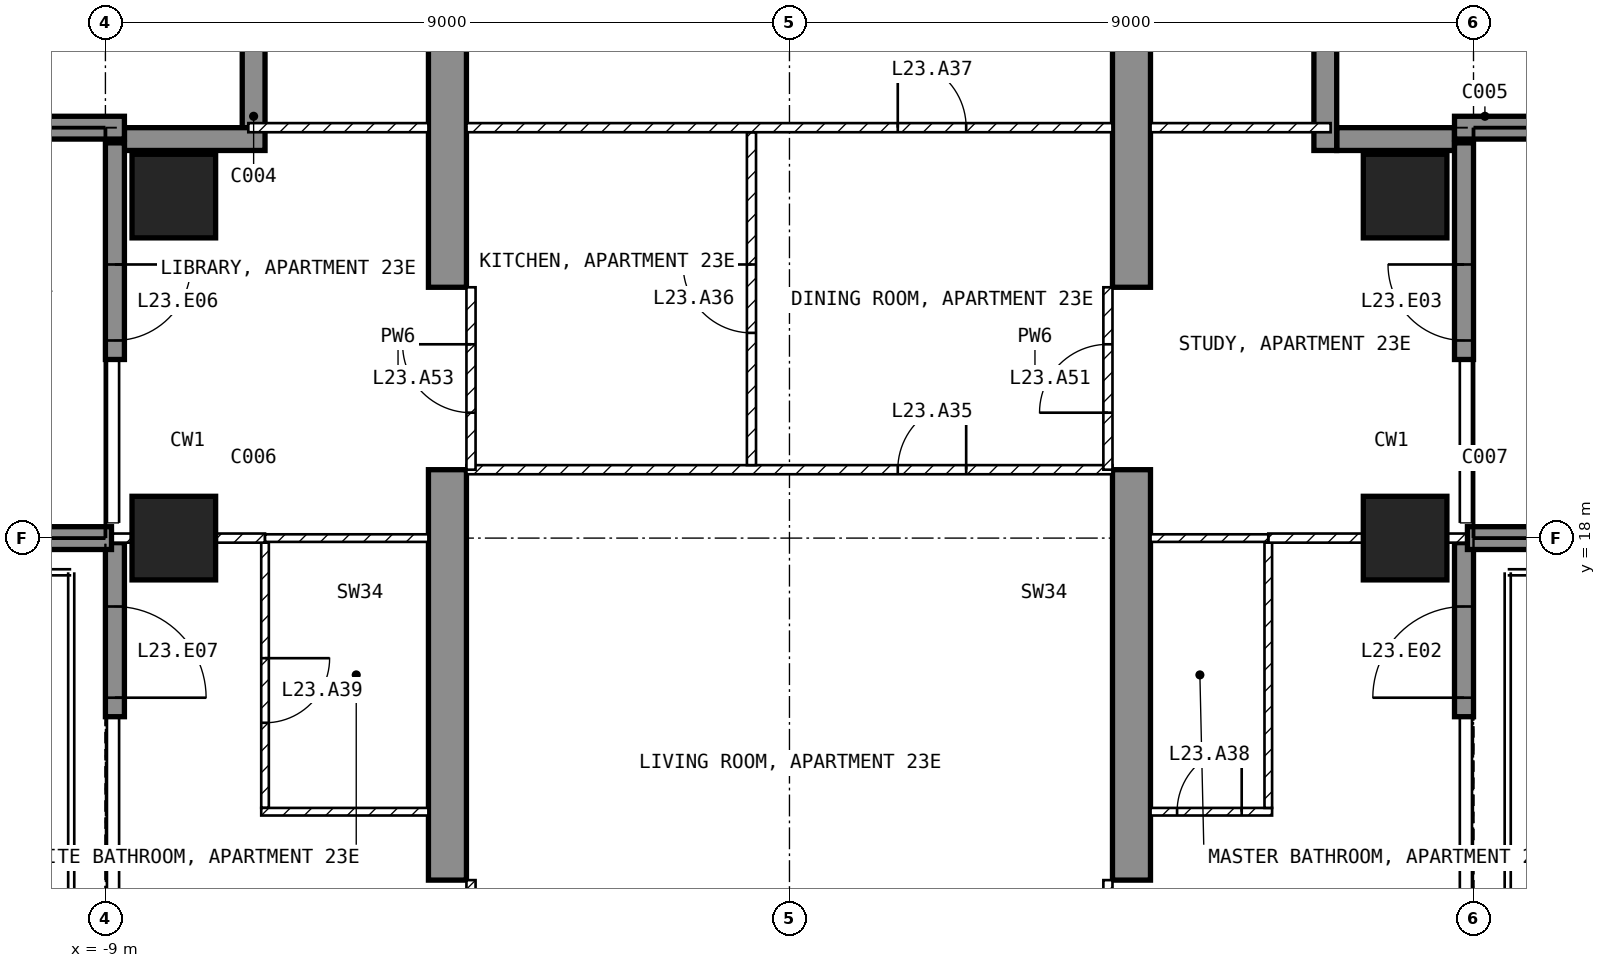
"""IFC4 building model, lengths in metres.
Left out: names, types, materials, properties, quantities, classifications, styles, units other than length and angle.
Written with IfcOpenShell. Run it as: python <this file> out.ifc"""

import sys

from ifc_helpers import new_model, si_unit, direction, frame, frame_2d, origin, origin_2d, place, context, subcontext, project, spatial, polyline, rectangle, outline, extrude, element, fill, save


model = new_model("IFC4")
c1 = context("Model", 3, precision=1e-05, world=origin(), true_north=direction((0.0, 1.0)))
c2 = subcontext(c1, "Body", "Model", "MODEL_VIEW")
j1 = project(units=[si_unit("LENGTHUNIT", "METRE"), si_unit("PLANEANGLEUNIT", "RADIAN")], contexts=[c1])
p1 = place(None, origin())
s1 = spatial("IfcSite", under=j1, at=p1, CompositionType="ELEMENT")
p2 = place(p1, origin())
s2 = spatial("IfcBuilding", under=s1, at=p2, CompositionType="ELEMENT")
p3 = place(p2, frame((0.0, 0.0, 102.4)))
s3 = spatial("IfcBuildingStorey", under=s2, at=p3, CompositionType="ELEMENT", Elevation=102.4)
for number, where, z_axis, x_axis in (
    (1, (-8.1, 18.0, -0.25), (0.0, 0.0, 1.0), (1.0, 0.0, 0.0)),
    (2, (-8.1, 22.5, -0.25), (0.0, 0.0, 1.0), (1.0, 0.0, 0.0)),
    (3, (8.1, 18.0, -0.25), (0.0, 0.0, 1.0), (1.0, 0.0, 0.0)),
    (4, (8.1, 22.5, -0.25), (0.0, 0.0, 1.0), (1.0, 0.0, 0.0)),
):
    element("IfcColumn", number, at=place(p3, frame(where, z_axis=z_axis, x_axis=x_axis)), inside=s3, PredefinedType="COLUMN", context=c2, shape_type="SweptSolid", body=[
        extrude(rectangle(XDim=1.1, YDim=1.1, at=origin_2d()), origin(), (0.0, 0.0, 1.0), 3.5),
    ])
for number, where, z_axis, x_axis in (
    (5, (-4.75, 9.0, -0.25), (1.0, 0.0, 0.0), (0.0, 1.0, 0.0)),
    (6, (4.25, 9.0, -0.25), (1.0, 0.0, 0.0), (0.0, 1.0, 0.0)),
):
    element("IfcWall", number, at=place(p3, frame(where, z_axis=z_axis, x_axis=x_axis)), inside=s3, PredefinedType="SHEAR", context=c2, shape_type="SweptSolid", body=[
        extrude(outline(polyline([(0.0, 0.0), (2.1, 0.0), (2.1, 2.65), (4.5, 2.65), (4.5, 0.0), (9.9, 0.0), (9.9, 2.65), (12.3, 2.65), (12.3, 0.0), (16.55, 0.0), (16.55, 3.5), (0.0, 3.5), (0.0, 0.0)])), origin(), (0.0, 0.0, 1.0), 0.5),
    ])
p4 = place(p3, frame((8.875, 15.65, 0.0), z_axis=(0.0, 0.0, 1.0), x_axis=(0.0, 1.0, 0.0)))
e7 = element("IfcWall", 7, at=p4, inside=s3, PredefinedType="SOLIDWALL", context=c2, shape_type="SweptSolid", body=[
    extrude(rectangle(XDim=2.29, YDim=0.25, at=frame_2d((1.145, 0.0))), origin(), (0.0, 0.0, 1.0), 3.25),
])
p5 = place(p4, frame((0.25, 0.0, 0.0)))
e8 = element("IfcOpeningElement", 8, at=p5, cuts=e7, PredefinedType="OPENING", context=c2, shape_type="SweptSolid", body=[
    extrude(rectangle(XDim=1.2, YDim=2.4, at=frame_2d((0.6, 1.2))), frame((0.0, 0.135, 0.0), z_axis=(0.0, -1.0, 0.0), x_axis=(1.0, 0.0, 0.0)), (0.0, 0.0, 1.0), 0.27),
])
p6 = place(p3, frame((8.875, 20.35, 0.0), z_axis=(0.0, 0.0, 1.0), x_axis=(0.0, 1.0, 0.0)))
e9 = element("IfcWall", 9, at=p6, inside=s3, PredefinedType="SOLIDWALL", context=c2, shape_type="SweptSolid", body=[
    extrude(rectangle(XDim=2.85, YDim=0.25, at=frame_2d((1.425, 0.0))), origin(), (0.0, 0.0, 1.0), 3.25),
])
p7 = place(p6, frame((0.25, 0.0, 0.0)))
e10 = element("IfcOpeningElement", 10, at=p7, cuts=e9, PredefinedType="OPENING", context=c2, shape_type="SweptSolid", body=[
    extrude(rectangle(XDim=1.0, YDim=2.4, at=frame_2d((0.5, 1.2))), frame((0.0, 0.135, 0.0), z_axis=(0.0, -1.0, 0.0), x_axis=(1.0, 0.0, 0.0)), (0.0, 0.0, 1.0), 0.27),
])
p8 = place(p3, frame((-8.875, 23.2, 0.0), z_axis=(0.0, 0.0, 1.0), x_axis=(0.0, -1.0, 0.0)))
e11 = element("IfcWall", 11, at=p8, inside=s3, PredefinedType="SOLIDWALL", context=c2, shape_type="SweptSolid", body=[
    extrude(rectangle(XDim=2.85, YDim=0.25, at=frame_2d((1.425, 0.0))), origin(), (0.0, 0.0, 1.0), 3.25),
])
p9 = place(p8, frame((1.6, 0.0, 0.0)))
e12 = element("IfcOpeningElement", 12, at=p9, cuts=e11, PredefinedType="OPENING", context=c2, shape_type="SweptSolid", body=[
    extrude(rectangle(XDim=1.0, YDim=2.4, at=frame_2d((0.5, 1.2))), frame((0.0, 0.135, 0.0), z_axis=(0.0, -1.0, 0.0), x_axis=(1.0, 0.0, 0.0)), (0.0, 0.0, 1.0), 0.27),
])
p10 = place(p3, frame((-8.875, 17.94, 0.0), z_axis=(0.0, 0.0, 1.0), x_axis=(0.0, -1.0, 0.0)))
e13 = element("IfcWall", 13, at=p10, inside=s3, PredefinedType="SOLIDWALL", context=c2, shape_type="SweptSolid", body=[
    extrude(rectangle(XDim=2.29, YDim=0.25, at=frame_2d((1.145, 0.0))), origin(), (0.0, 0.0, 1.0), 3.25),
])
p11 = place(p10, frame((0.84, 0.0, 0.0)))
e14 = element("IfcOpeningElement", 14, at=p11, cuts=e13, PredefinedType="OPENING", context=c2, shape_type="SweptSolid", body=[
    extrude(rectangle(XDim=1.2, YDim=2.4, at=frame_2d((0.6, 1.2))), frame((0.0, 0.135, 0.0), z_axis=(0.0, -1.0, 0.0), x_axis=(1.0, 0.0, 0.0)), (0.0, 0.0, 1.0), 0.27),
])
p12 = place(p3, frame((8.75, 23.25, 0.0), z_axis=(0.0, 0.0, 1.0), x_axis=(-1.0, 0.0, 0.0)))
e15 = element("IfcWall", 15, at=p12, inside=s3, PredefinedType="SOLIDWALL", context=c2, shape_type="SweptSolid", body=[
    extrude(rectangle(XDim=1.55, YDim=0.3, at=frame_2d((0.775, 0.0))), origin(), (0.0, 0.0, 1.0), 3.25),
])
p13 = place(p3, frame((7.05, 23.1, 0.0), z_axis=(0.0, 0.0, 1.0), x_axis=(0.0, 1.0, 0.0)))
e16 = element("IfcWall", 16, at=p13, inside=s3, PredefinedType="SOLIDWALL", context=c2, shape_type="SweptSolid", body=[
    extrude(rectangle(XDim=1.8, YDim=0.3, at=frame_2d((0.9, 0.0))), origin(), (0.0, 0.0, 1.0), 3.25),
])
p14 = place(p3, frame((-7.05, 25.2, 0.0), z_axis=(0.0, 0.0, 1.0), x_axis=(0.0, -1.0, 0.0)))
e17 = element("IfcWall", 17, at=p14, inside=s3, PredefinedType="SOLIDWALL", context=c2, shape_type="SweptSolid", body=[
    extrude(rectangle(XDim=1.8, YDim=0.3, at=frame_2d((0.9, 0.0))), origin(), (0.0, 0.0, 1.0), 3.25),
])
p15 = place(p3, frame((-6.9, 23.25, 0.0), z_axis=(0.0, 0.0, 1.0), x_axis=(-1.0, 0.0, 0.0)))
e18 = element("IfcWall", 18, at=p15, inside=s3, PredefinedType="SOLIDWALL", context=c2, shape_type="SweptSolid", body=[
    extrude(rectangle(XDim=1.85, YDim=0.3, at=frame_2d((0.925, 0.0))), origin(), (0.0, 0.0, 1.0), 3.25),
])
p16 = place(p3, frame((-8.92, 18.0, 0.0), z_axis=(0.0, 0.0, 1.0), x_axis=(-1.0, 0.0, 0.0)))
e19 = element("IfcWall", 19, at=p16, inside=s3, PredefinedType="SOLIDWALL", context=c2, shape_type="SweptSolid", body=[
    extrude(rectangle(XDim=2.82, YDim=0.3, at=frame_2d((1.41, 0.0))), origin(), (0.0, 0.0, 1.0), 3.25),
])
p17 = place(p3, frame((-8.75, 23.4, 0.0), z_axis=(0.0, 0.0, 1.0), x_axis=(-1.0, 0.0, 0.0)))
e20 = element("IfcWall", 20, at=p17, inside=s3, PredefinedType="SOLIDWALL", context=c2, shape_type="SweptSolid", body=[
    extrude(rectangle(XDim=2.95, YDim=0.3, at=frame_2d((1.475, 0.0))), origin(), (0.0, 0.0, 1.0), 3.25),
])
p18 = place(p3, frame((8.92, 18.0, 0.0), z_axis=(0.0, 0.0, 1.0), x_axis=(1.0, 0.0, 0.0)))
e21 = element("IfcWall", 21, at=p18, inside=s3, PredefinedType="SOLIDWALL", context=c2, shape_type="SweptSolid", body=[
    extrude(rectangle(XDim=2.82, YDim=0.3, at=frame_2d((1.41, 0.0))), origin(), (0.0, 0.0, 1.0), 3.25),
])
p19 = place(p3, frame((8.75, 23.4, 0.0), z_axis=(0.0, 0.0, 1.0), x_axis=(1.0, 0.0, 0.0)))
e22 = element("IfcWall", 22, at=p19, inside=s3, PredefinedType="SOLIDWALL", context=c2, shape_type="SweptSolid", body=[
    extrude(rectangle(XDim=2.95, YDim=0.3, at=frame_2d((1.475, 0.0))), origin(), (0.0, 0.0, 1.0), 3.25),
])
p20 = place(p3, frame((-4.25, 18.9, 0.0), z_axis=(0.0, 0.0, 1.0), x_axis=(1.0, 0.0, 0.0)))
e23 = element("IfcWall", 23, at=p20, inside=s3, PredefinedType="PARTITIONING", context=c2, shape_type="SweptSolid", body=[
    extrude(rectangle(XDim=8.5, YDim=0.12, at=frame_2d((4.25, 0.0))), origin(), (0.0, 0.0, 1.0), 3.25),
])
p21 = place(p20, frame((5.675, 0.0, 0.0)))
e24 = element("IfcOpeningElement", 24, at=p21, cuts=e23, PredefinedType="OPENING", context=c2, shape_type="SweptSolid", body=[
    extrude(rectangle(XDim=0.9, YDim=2.1, at=frame_2d((0.45, 1.05))), frame((0.0, 0.07, 0.0), z_axis=(0.0, -1.0, 0.0), x_axis=(1.0, 0.0, 0.0)), (0.0, 0.0, 1.0), 0.14),
])
p22 = place(p3, frame((-0.5, 18.96, 0.0), z_axis=(0.0, 0.0, 1.0), x_axis=(0.0, 1.0, 0.0)))
e25 = element("IfcWall", 25, at=p22, inside=s3, PredefinedType="PARTITIONING", context=c2, shape_type="SweptSolid", body=[
    extrude(rectangle(XDim=4.38, YDim=0.12, at=frame_2d((2.19, 0.0))), origin(), (0.0, 0.0, 1.0), 3.25),
])
p23 = place(p22, frame((1.74, 0.0, 0.0)))
e26 = element("IfcOpeningElement", 26, at=p23, cuts=e25, PredefinedType="OPENING", context=c2, shape_type="SweptSolid", body=[
    extrude(rectangle(XDim=0.9, YDim=2.1, at=frame_2d((0.45, 1.05))), frame((0.0, 0.07, 0.0), z_axis=(0.0, -1.0, 0.0), x_axis=(1.0, 0.0, 0.0)), (0.0, 0.0, 1.0), 0.14),
])
p24 = place(p3, frame((-4.25, 23.4, 0.0), z_axis=(0.0, 0.0, 1.0), x_axis=(1.0, 0.0, 0.0)))
e27 = element("IfcWall", 27, at=p24, inside=s3, PredefinedType="PARTITIONING", context=c2, shape_type="SweptSolid", body=[
    extrude(rectangle(XDim=8.5, YDim=0.12, at=frame_2d((4.25, 0.0))), origin(), (0.0, 0.0, 1.0), 3.25),
])
p25 = place(p24, frame((5.675, 0.0, 0.0)))
e28 = element("IfcOpeningElement", 28, at=p25, cuts=e27, PredefinedType="OPENING", context=c2, shape_type="SweptSolid", body=[
    extrude(rectangle(XDim=0.9, YDim=2.1, at=frame_2d((0.45, 1.05))), frame((0.0, 0.07, 0.0), z_axis=(0.0, -1.0, 0.0), x_axis=(1.0, 0.0, 0.0)), (0.0, 0.0, 1.0), 0.14),
])
p26 = place(p3, frame((4.75, 14.4, 0.0), z_axis=(0.0, 0.0, 1.0), x_axis=(1.0, 0.0, 0.0)))
e29 = element("IfcWall", 29, at=p26, inside=s3, PredefinedType="PARTITIONING", context=c2, shape_type="SweptSolid", body=[
    extrude(rectangle(XDim=1.6, YDim=0.1, at=frame_2d((0.8, 0.0))), origin(), (0.0, 0.0, 1.0), 3.25),
])
p27 = place(p26, frame((0.35, 0.0, 0.0)))
e30 = element("IfcOpeningElement", 30, at=p27, cuts=e29, PredefinedType="OPENING", context=c2, shape_type="SweptSolid", body=[
    extrude(rectangle(XDim=0.85, YDim=2.1, at=frame_2d((0.425, 1.05))), frame((0.0, 0.06, 0.0), z_axis=(0.0, -1.0, 0.0), x_axis=(1.0, 0.0, 0.0)), (0.0, 0.0, 1.0), 0.12),
])
p28 = place(p3, frame((6.3, 14.45, 0.0), z_axis=(0.0, 0.0, 1.0), x_axis=(0.0, 1.0, 0.0)))
e31 = element("IfcWall", 31, at=p28, inside=s3, PredefinedType="PARTITIONING", context=c2, shape_type="SweptSolid", body=[
    extrude(rectangle(XDim=3.49, YDim=0.1, at=frame_2d((1.745, 0.0))), origin(), (0.0, 0.0, 1.0), 3.25),
])
p29 = place(p3, frame((6.3, 18.0, 0.0), z_axis=(0.0, 0.0, 1.0), x_axis=(1.0, 0.0, 0.0)))
e32 = element("IfcWall", 32, at=p29, inside=s3, PredefinedType="PARTITIONING", context=c2, shape_type="SweptSolid", body=[
    extrude(rectangle(XDim=2.62, YDim=0.12, at=frame_2d((1.31, 0.0))), origin(), (0.0, 0.0, 1.0), 2.414),
])
p30 = place(p3, frame((4.75, 18.0, 0.0), z_axis=(0.0, 0.0, 1.0), x_axis=(1.0, 0.0, 0.0)))
e33 = element("IfcWall", 33, at=p30, inside=s3, PredefinedType="PARTITIONING", context=c2, shape_type="SweptSolid", body=[
    extrude(rectangle(XDim=1.55, YDim=0.1, at=frame_2d((0.775, 0.0))), origin(), (0.0, 0.0, 1.0), 2.414),
])
p31 = place(p3, frame((4.75, 23.4, 0.0), z_axis=(0.0, 0.0, 1.0), x_axis=(1.0, 0.0, 0.0)))
e34 = element("IfcWall", 34, at=p31, inside=s3, PredefinedType="PARTITIONING", context=c2, shape_type="SweptSolid", body=[
    extrude(rectangle(XDim=2.37, YDim=0.12, at=frame_2d((1.185, 0.0))), origin(), (0.0, 0.0, 1.0), 3.25),
])
p32 = place(p3, frame((-6.9, 17.94, 0.0), z_axis=(0.0, 0.0, 1.0), x_axis=(0.0, -1.0, 0.0)))
e35 = element("IfcWall", 35, at=p32, inside=s3, PredefinedType="PARTITIONING", context=c2, shape_type="SweptSolid", body=[
    extrude(rectangle(XDim=3.49, YDim=0.1, at=frame_2d((1.745, 0.0))), origin(), (0.0, 0.0, 1.0), 3.25),
])
p33 = place(p32, frame((1.52, 0.0, 0.0)))
e36 = element("IfcOpeningElement", 36, at=p33, cuts=e35, PredefinedType="OPENING", context=c2, shape_type="SweptSolid", body=[
    extrude(rectangle(XDim=0.85, YDim=2.1, at=frame_2d((0.425, 1.05))), frame((0.0, 0.06, 0.0), z_axis=(0.0, -1.0, 0.0), x_axis=(1.0, 0.0, 0.0)), (0.0, 0.0, 1.0), 0.12),
])
p34 = place(p3, frame((-6.95, 14.4, 0.0), z_axis=(0.0, 0.0, 1.0), x_axis=(1.0, 0.0, 0.0)))
e37 = element("IfcWall", 37, at=p34, inside=s3, PredefinedType="PARTITIONING", context=c2, shape_type="SweptSolid", body=[
    extrude(rectangle(XDim=2.2, YDim=0.1, at=frame_2d((1.1, 0.0))), origin(), (0.0, 0.0, 1.0), 3.25),
])
p35 = place(p3, frame((-8.92, 18.0, 0.0), z_axis=(0.0, 0.0, 1.0), x_axis=(1.0, 0.0, 0.0)))
e38 = element("IfcWall", 38, at=p35, inside=s3, PredefinedType="PARTITIONING", context=c2, shape_type="SweptSolid", body=[
    extrude(rectangle(XDim=2.02, YDim=0.12, at=frame_2d((1.01, 0.0))), origin(), (0.0, 0.0, 1.0), 2.414),
])
p36 = place(p3, frame((-6.9, 18.0, 0.0), z_axis=(0.0, 0.0, 1.0), x_axis=(1.0, 0.0, 0.0)))
e39 = element("IfcWall", 39, at=p36, inside=s3, PredefinedType="PARTITIONING", context=c2, shape_type="SweptSolid", body=[
    extrude(rectangle(XDim=2.15, YDim=0.1, at=frame_2d((1.075, 0.0))), origin(), (0.0, 0.0, 1.0), 2.414),
])
p37 = place(p3, frame((-7.12, 23.4, 0.0), z_axis=(0.0, 0.0, 1.0), x_axis=(1.0, 0.0, 0.0)))
e40 = element("IfcWall", 40, at=p37, inside=s3, PredefinedType="PARTITIONING", context=c2, shape_type="SweptSolid", body=[
    extrude(rectangle(XDim=2.37, YDim=0.12, at=frame_2d((1.185, 0.0))), origin(), (0.0, 0.0, 1.0), 3.25),
])
p38 = place(p3, frame((4.19, 11.1, 0.0), z_axis=(0.0, 0.0, 1.0), x_axis=(0.0, 1.0, 0.0)))
e41 = element("IfcWall", 41, at=p38, inside=s3, PredefinedType="PARTITIONING", context=c2, shape_type="SweptSolid", body=[
    extrude(rectangle(XDim=2.4, YDim=0.12, at=frame_2d((1.2, 0.0))), origin(), (0.0, 0.0, 1.0), 2.4),
])
p39 = place(p38, frame((0.75, 0.0, 0.0)))
e42 = element("IfcOpeningElement", 42, at=p39, cuts=e41, PredefinedType="OPENING", context=c2, shape_type="SweptSolid", body=[
    extrude(rectangle(XDim=0.9, YDim=2.1, at=frame_2d((0.45, 1.05))), frame((0.0, 0.07, 0.0), z_axis=(0.0, -1.0, 0.0), x_axis=(1.0, 0.0, 0.0)), (0.0, 0.0, 1.0), 0.14),
])
p40 = place(p3, frame((4.19, 18.9, 0.0), z_axis=(0.0, 0.0, 1.0), x_axis=(0.0, 1.0, 0.0)))
e43 = element("IfcWall", 43, at=p40, inside=s3, PredefinedType="PARTITIONING", context=c2, shape_type="SweptSolid", body=[
    extrude(rectangle(XDim=2.4, YDim=0.12, at=frame_2d((1.2, 0.0))), origin(), (0.0, 0.0, 1.0), 2.4),
])
p41 = place(p40, frame((0.75, 0.0, 0.0)))
e44 = element("IfcOpeningElement", 44, at=p41, cuts=e43, PredefinedType="OPENING", context=c2, shape_type="SweptSolid", body=[
    extrude(rectangle(XDim=0.9, YDim=2.1, at=frame_2d((0.45, 1.05))), frame((0.0, 0.07, 0.0), z_axis=(0.0, -1.0, 0.0), x_axis=(1.0, 0.0, 0.0)), (0.0, 0.0, 1.0), 0.14),
])
p42 = place(p3, frame((-4.19, 11.1, 0.0), z_axis=(0.0, 0.0, 1.0), x_axis=(0.0, 1.0, 0.0)))
e45 = element("IfcWall", 45, at=p42, inside=s3, PredefinedType="PARTITIONING", context=c2, shape_type="SweptSolid", body=[
    extrude(rectangle(XDim=2.4, YDim=0.12, at=frame_2d((1.2, 0.0))), origin(), (0.0, 0.0, 1.0), 2.4),
])
p43 = place(p42, frame((0.75, 0.0, 0.0)))
e46 = element("IfcOpeningElement", 46, at=p43, cuts=e45, PredefinedType="OPENING", context=c2, shape_type="SweptSolid", body=[
    extrude(rectangle(XDim=0.9, YDim=2.1, at=frame_2d((0.45, 1.05))), frame((0.0, 0.07, 0.0), z_axis=(0.0, -1.0, 0.0), x_axis=(1.0, 0.0, 0.0)), (0.0, 0.0, 1.0), 0.14),
])
p44 = place(p3, frame((-4.19, 18.9, 0.0), z_axis=(0.0, 0.0, 1.0), x_axis=(0.0, 1.0, 0.0)))
e47 = element("IfcWall", 47, at=p44, inside=s3, PredefinedType="PARTITIONING", context=c2, shape_type="SweptSolid", body=[
    extrude(rectangle(XDim=2.4, YDim=0.12, at=frame_2d((1.2, 0.0))), origin(), (0.0, 0.0, 1.0), 2.4),
])
p45 = place(p44, frame((0.75, 0.0, 0.0)))
e48 = element("IfcOpeningElement", 48, at=p45, cuts=e47, PredefinedType="OPENING", context=c2, shape_type="SweptSolid", body=[
    extrude(rectangle(XDim=0.9, YDim=2.1, at=frame_2d((0.45, 1.05))), frame((0.0, 0.07, 0.0), z_axis=(0.0, -1.0, 0.0), x_axis=(1.0, 0.0, 0.0)), (0.0, 0.0, 1.0), 0.14),
])
p46 = place(p5, origin())
e49 = element("IfcDoor", 49, at=p46, inside=s3, OperationType="SINGLE_SWING_LEFT", PredefinedType="DOOR", context=c2, shape_type="SweptSolid", body=[
    extrude(rectangle(XDim=1.2, YDim=2.4, at=frame_2d((0.6, 1.2))), frame((0.0, 0.025, 0.0), z_axis=(0.0, -1.0, 0.0), x_axis=(1.0, 0.0, 0.0)), (0.0, 0.0, 1.0), 0.05),
])
fill(e8, e49)
p47 = place(p7, origin())
e50 = element("IfcDoor", 50, at=p47, inside=s3, OperationType="SINGLE_SWING_RIGHT", PredefinedType="DOOR", context=c2, shape_type="SweptSolid", body=[
    extrude(rectangle(XDim=1.0, YDim=2.4, at=frame_2d((0.5, 1.2))), frame((0.0, 0.025, 0.0), z_axis=(0.0, -1.0, 0.0), x_axis=(1.0, 0.0, 0.0)), (0.0, 0.0, 1.0), 0.05),
])
fill(e10, e50)
p48 = place(p9, origin())
e51 = element("IfcDoor", 51, at=p48, inside=s3, OperationType="SINGLE_SWING_LEFT", PredefinedType="DOOR", context=c2, shape_type="SweptSolid", body=[
    extrude(rectangle(XDim=1.0, YDim=2.4, at=frame_2d((0.5, 1.2))), frame((0.0, 0.025, 0.0), z_axis=(0.0, -1.0, 0.0), x_axis=(1.0, 0.0, 0.0)), (0.0, 0.0, 1.0), 0.05),
])
fill(e12, e51)
p49 = place(p11, origin())
e52 = element("IfcDoor", 52, at=p49, inside=s3, OperationType="SINGLE_SWING_RIGHT", PredefinedType="DOOR", context=c2, shape_type="SweptSolid", body=[
    extrude(rectangle(XDim=1.2, YDim=2.4, at=frame_2d((0.6, 1.2))), frame((0.0, 0.025, 0.0), z_axis=(0.0, -1.0, 0.0), x_axis=(1.0, 0.0, 0.0)), (0.0, 0.0, 1.0), 0.05),
])
fill(e14, e52)
p50 = place(p21, origin())
e53 = element("IfcDoor", 53, at=p50, inside=s3, OperationType="SINGLE_SWING_RIGHT", PredefinedType="DOOR", context=c2, shape_type="SweptSolid", body=[
    extrude(rectangle(XDim=0.9, YDim=2.1, at=frame_2d((0.45, 1.05))), frame((0.0, 0.025, 0.0), z_axis=(0.0, -1.0, 0.0), x_axis=(1.0, 0.0, 0.0)), (0.0, 0.0, 1.0), 0.05),
])
fill(e24, e53)
p51 = place(p23, origin())
e54 = element("IfcDoor", 54, at=p51, inside=s3, OperationType="SINGLE_SWING_RIGHT", PredefinedType="DOOR", context=c2, shape_type="SweptSolid", body=[
    extrude(rectangle(XDim=0.9, YDim=2.1, at=frame_2d((0.45, 1.05))), frame((0.0, 0.025, 0.0), z_axis=(0.0, -1.0, 0.0), x_axis=(1.0, 0.0, 0.0)), (0.0, 0.0, 1.0), 0.05),
])
fill(e26, e54)
p52 = place(p25, origin())
e55 = element("IfcDoor", 55, at=p52, inside=s3, OperationType="SINGLE_SWING_LEFT", PredefinedType="DOOR", context=c2, shape_type="SweptSolid", body=[
    extrude(rectangle(XDim=0.9, YDim=2.1, at=frame_2d((0.45, 1.05))), frame((0.0, 0.025, 0.0), z_axis=(0.0, -1.0, 0.0), x_axis=(1.0, 0.0, 0.0)), (0.0, 0.0, 1.0), 0.05),
])
fill(e28, e55)
p53 = place(p27, origin())
e56 = element("IfcDoor", 56, at=p53, inside=s3, OperationType="SINGLE_SWING_RIGHT", PredefinedType="DOOR", context=c2, shape_type="SweptSolid", body=[
    extrude(rectangle(XDim=0.85, YDim=2.1, at=frame_2d((0.425, 1.05))), frame((0.0, 0.025, 0.0), z_axis=(0.0, -1.0, 0.0), x_axis=(1.0, 0.0, 0.0)), (0.0, 0.0, 1.0), 0.05),
])
fill(e30, e56)
p54 = place(p33, origin())
e57 = element("IfcDoor", 57, at=p54, inside=s3, OperationType="SINGLE_SWING_LEFT", PredefinedType="DOOR", context=c2, shape_type="SweptSolid", body=[
    extrude(rectangle(XDim=0.85, YDim=2.1, at=frame_2d((0.425, 1.05))), frame((0.0, 0.025, 0.0), z_axis=(0.0, -1.0, 0.0), x_axis=(1.0, 0.0, 0.0)), (0.0, 0.0, 1.0), 0.05),
])
fill(e36, e57)
p55 = place(p41, origin())
e58 = element("IfcDoor", 58, at=p55, inside=s3, OperationType="SINGLE_SWING_LEFT", PredefinedType="DOOR", context=c2, shape_type="SweptSolid", body=[
    extrude(rectangle(XDim=0.9, YDim=2.1, at=frame_2d((0.45, 1.05))), frame((0.0, 0.025, 0.0), z_axis=(0.0, -1.0, 0.0), x_axis=(1.0, 0.0, 0.0)), (0.0, 0.0, 1.0), 0.05),
])
fill(e44, e58)
p56 = place(p45, origin())
e59 = element("IfcDoor", 59, at=p56, inside=s3, OperationType="SINGLE_SWING_RIGHT", PredefinedType="DOOR", context=c2, shape_type="SweptSolid", body=[
    extrude(rectangle(XDim=0.9, YDim=2.1, at=frame_2d((0.45, 1.05))), frame((0.0, 0.025, 0.0), z_axis=(0.0, -1.0, 0.0), x_axis=(1.0, 0.0, 0.0)), (0.0, 0.0, 1.0), 0.05),
])
fill(e48, e59)
save(model, sys.argv[1])
